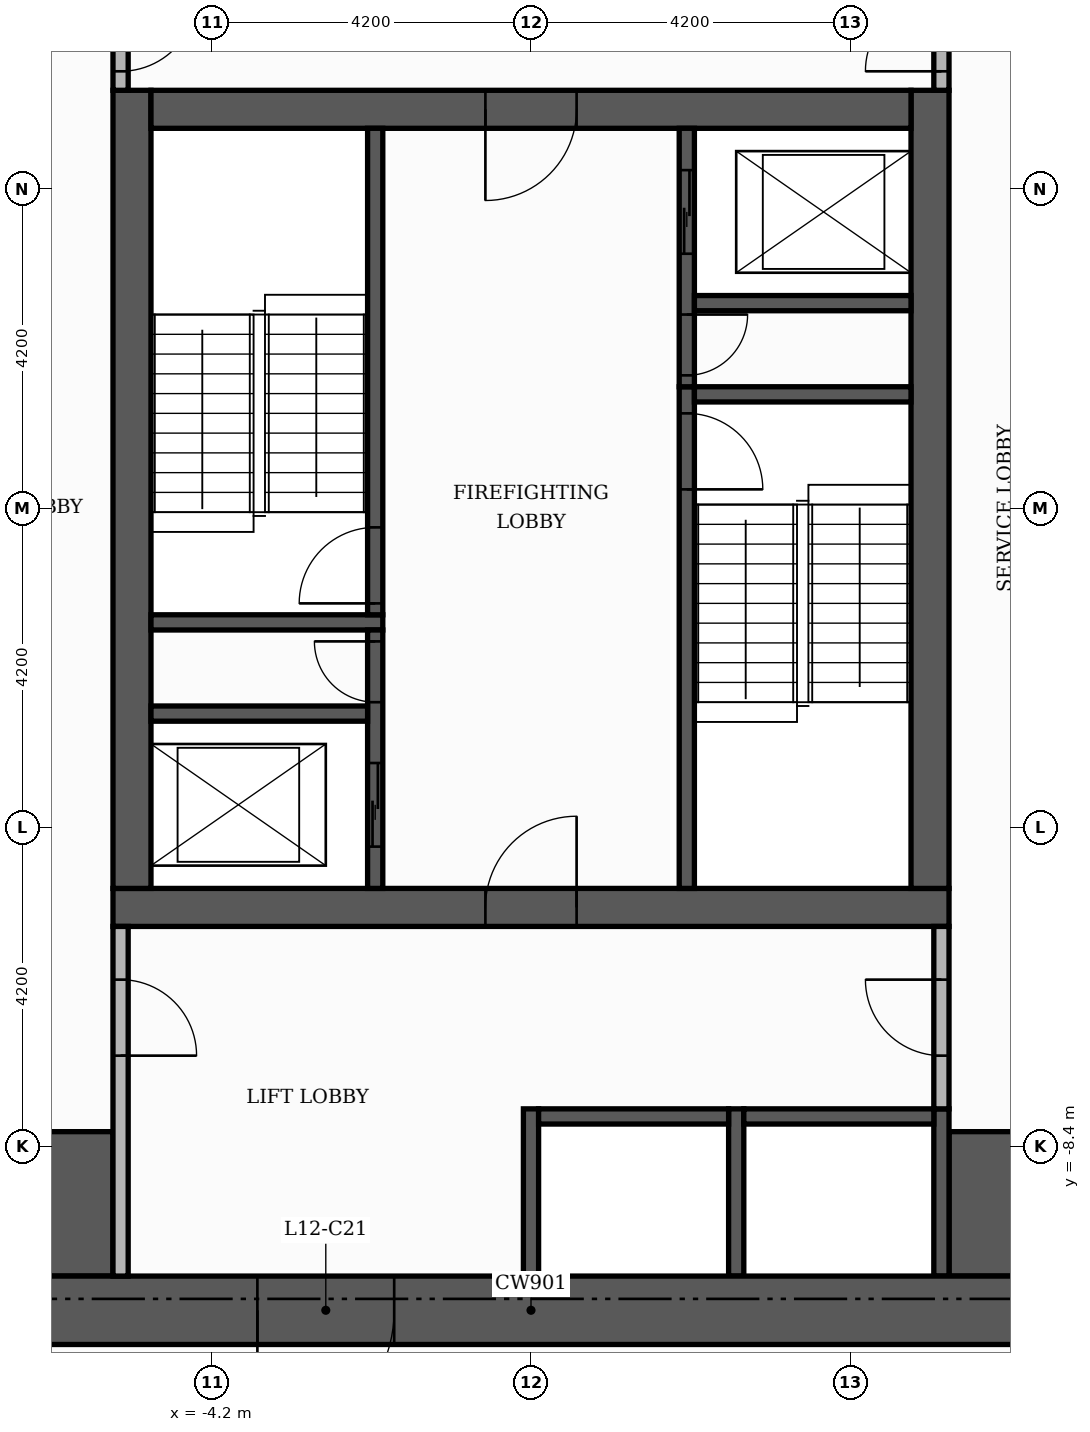
"""IFC4 building model, lengths in metres.
Left out: names, types, materials, properties, quantities, classifications, styles, units other than length and angle.
Written with IfcOpenShell. Run it as: python <this file> out.ifc"""

import sys

from ifc_helpers import new_model, si_unit, direction, frame, frame_2d, origin, place, context, subcontext, project, spatial, rectangle, extrude, element, fill, save


model = new_model("IFC4")
c1 = context("Model", 3, precision=1e-05, world=origin(), true_north=direction((0.0, 1.0)))
c2 = subcontext(c1, "Body", "Model", "MODEL_VIEW")
j1 = project(units=[si_unit("LENGTHUNIT", "METRE"), si_unit("PLANEANGLEUNIT", "RADIAN")], contexts=[c1])
p1 = place(None, origin())
s1 = spatial("IfcSite", under=j1, at=p1, CompositionType="ELEMENT")
p2 = place(p1, origin())
s2 = spatial("IfcBuilding", under=s1, at=p2, CompositionType="ELEMENT")
p3 = place(p2, frame((0.0, 0.0, 54.3)))
s3 = spatial("IfcBuildingStorey", under=s2, at=p3, CompositionType="ELEMENT", Elevation=54.3)
p4 = place(p3, frame((-5.5, -5.25, 0.0), z_axis=(0.0, 0.0, 1.0), x_axis=(1.0, 0.0, 0.0)))
e1 = element("IfcWall", 1, at=p4, inside=s3, PredefinedType="SHEAR", context=c2, shape_type="SweptSolid", body=[
    extrude(rectangle(XDim=11.0, YDim=0.5, at=frame_2d((5.5, 0.0))), origin(), (0.0, 0.0, 1.0), 3.48),
])
p5 = place(p4, frame((4.9, 0.0, 0.0)))
e2 = element("IfcOpeningElement", 2, at=p5, cuts=e1, PredefinedType="OPENING", context=c2, shape_type="SweptSolid", body=[
    extrude(rectangle(XDim=1.2, YDim=2.1, at=frame_2d((0.6, 1.05))), frame((0.0, 0.26, 0.0), z_axis=(0.0, -1.0, 0.0), x_axis=(1.0, 0.0, 0.0)), (0.0, 0.0, 1.0), 0.52),
])
for number, where, z_axis, x_axis in (
    (3, (-5.25, -5.0, 0.0), (0.0, 0.0, 1.0), (0.0, 1.0, 0.0)),
    (4, (5.25, -5.0, 0.0), (0.0, 0.0, 1.0), (0.0, 1.0, 0.0)),
):
    element("IfcWall", number, at=place(p3, frame(where, z_axis=z_axis, x_axis=x_axis)), inside=s3, PredefinedType="SHEAR", context=c2, shape_type="SweptSolid", body=[
        extrude(rectangle(XDim=10.5, YDim=0.5, at=frame_2d((5.25, 0.0))), origin(), (0.0, 0.0, 1.0), 3.48),
    ])
p6 = place(p3, frame((-5.0, 5.25, 0.0), z_axis=(0.0, 0.0, 1.0), x_axis=(1.0, 0.0, 0.0)))
e5 = element("IfcWall", 5, at=p6, inside=s3, PredefinedType="SHEAR", context=c2, shape_type="SweptSolid", body=[
    extrude(rectangle(XDim=10.0, YDim=0.5, at=frame_2d((5.0, 0.0))), origin(), (0.0, 0.0, 1.0), 3.48),
])
p7 = place(p6, frame((4.4, 0.0, 0.0)))
e6 = element("IfcOpeningElement", 6, at=p7, cuts=e5, PredefinedType="OPENING", context=c2, shape_type="SweptSolid", body=[
    extrude(rectangle(XDim=1.2, YDim=2.1, at=frame_2d((0.6, 1.05))), frame((0.0, 0.26, 0.0), z_axis=(0.0, -1.0, 0.0), x_axis=(1.0, 0.0, 0.0)), (0.0, 0.0, 1.0), 0.52),
])
for number, where, z_axis, x_axis in (
    (7, (-10.1, -9.15, 0.0), (0.0, 0.0, 1.0), (1.0, 0.0, 0.0)),
    (8, (5.5, -9.15, 0.0), (0.0, 0.0, 1.0), (1.0, 0.0, 0.0)),
):
    element("IfcWall", number, at=place(p3, frame(where, z_axis=z_axis, x_axis=x_axis)), inside=s3, PredefinedType="SHEAR", context=c2, shape_type="SweptSolid", body=[
        extrude(rectangle(XDim=4.6, YDim=1.9, at=frame_2d((2.3, 0.0))), origin(), (0.0, 0.0, 1.0), 3.48),
    ])
p8 = place(p3, frame((2.05, -5.0, 0.0), z_axis=(0.0, 0.0, 1.0), x_axis=(0.0, 1.0, 0.0)))
e9 = element("IfcWall", 9, at=p8, inside=s3, PredefinedType="SHEAR", context=c2, shape_type="SweptSolid", body=[
    extrude(rectangle(XDim=6.6, YDim=0.2, at=frame_2d((3.3, 0.0))), origin(), (0.0, 0.0, 1.0), 3.48),
])
p9 = place(p8, frame((5.25, 0.0, 0.0)))
e10 = element("IfcOpeningElement", 10, at=p9, cuts=e9, PredefinedType="OPENING", context=c2, shape_type="SweptSolid", body=[
    extrude(rectangle(XDim=1.0, YDim=2.1, at=frame_2d((0.5, 1.05))), frame((0.0, 0.11, 0.0), z_axis=(0.0, -1.0, 0.0), x_axis=(1.0, 0.0, 0.0)), (0.0, 0.0, 1.0), 0.22),
])
p10 = place(p3, frame((-5.0, -1.5, 0.0), z_axis=(0.0, 0.0, 1.0), x_axis=(1.0, 0.0, 0.0)))
e11 = element("IfcWall", 11, at=p10, inside=s3, PredefinedType="SHEAR", context=c2, shape_type="SweptSolid", body=[
    extrude(rectangle(XDim=3.05, YDim=0.2, at=frame_2d((1.525, 0.0))), origin(), (0.0, 0.0, 1.0), 3.48),
])
p11 = place(p3, frame((-2.05, -1.4, 0.0), z_axis=(0.0, 0.0, 1.0), x_axis=(0.0, 1.0, 0.0)))
e12 = element("IfcWall", 12, at=p11, inside=s3, PredefinedType="SHEAR", context=c2, shape_type="SweptSolid", body=[
    extrude(rectangle(XDim=6.4, YDim=0.2, at=frame_2d((3.2, 0.0))), origin(), (0.0, 0.0, 1.0), 3.48),
])
p12 = place(p11, frame((0.15, 0.0, 0.0)))
e13 = element("IfcOpeningElement", 13, at=p12, cuts=e12, PredefinedType="OPENING", context=c2, shape_type="SweptSolid", body=[
    extrude(rectangle(XDim=1.0, YDim=2.1, at=frame_2d((0.5, 1.05))), frame((0.0, 0.11, 0.0), z_axis=(0.0, -1.0, 0.0), x_axis=(1.0, 0.0, 0.0)), (0.0, 0.0, 1.0), 0.22),
])
p13 = place(p3, frame((2.15, 1.5, 0.0), z_axis=(0.0, 0.0, 1.0), x_axis=(1.0, 0.0, 0.0)))
e14 = element("IfcWall", 14, at=p13, inside=s3, PredefinedType="SHEAR", context=c2, shape_type="SweptSolid", body=[
    extrude(rectangle(XDim=2.85, YDim=0.2, at=frame_2d((1.425, 0.0))), origin(), (0.0, 0.0, 1.0), 3.48),
])
for number, where, z_axis, x_axis in (
    (15, (0.0, -10.1, 0.0), (0.0, 0.0, 1.0), (0.0, 1.0, 0.0)),
    (16, (2.7, -10.1, 0.0), (0.0, 0.0, 1.0), (0.0, 1.0, 0.0)),
    (17, (5.4, -10.1, 0.0), (0.0, 0.0, 1.0), (0.0, 1.0, 0.0)),
):
    element("IfcWall", number, at=place(p3, frame(where, z_axis=z_axis, x_axis=x_axis)), inside=s3, PredefinedType="SHEAR", context=c2, shape_type="SweptSolid", body=[
        extrude(rectangle(XDim=2.2, YDim=0.2, at=frame_2d((1.1, 0.0))), origin(), (0.0, 0.0, 1.0), 3.48),
    ])
for number, where, z_axis, x_axis in (
    (18, (0.1, -8.0, 0.0), (0.0, 0.0, 1.0), (1.0, 0.0, 0.0)),
    (19, (2.8, -8.0, 0.0), (0.0, 0.0, 1.0), (1.0, 0.0, 0.0)),
):
    element("IfcWall", number, at=place(p3, frame(where, z_axis=z_axis, x_axis=x_axis)), inside=s3, PredefinedType="SHEAR", context=c2, shape_type="SweptSolid", body=[
        extrude(rectangle(XDim=2.5, YDim=0.2, at=frame_2d((1.25, 0.0))), origin(), (0.0, 0.0, 1.0), 3.48),
    ])
p14 = place(p3, frame((-2.05, -5.0, 0.0), z_axis=(0.0, 0.0, 1.0), x_axis=(0.0, 1.0, 0.0)))
e20 = element("IfcWall", 20, at=p14, inside=s3, PredefinedType="SHEAR", context=c2, shape_type="SweptSolid", body=[
    extrude(rectangle(XDim=3.4, YDim=0.2, at=frame_2d((1.7, 0.0))), origin(), (0.0, 0.0, 1.0), 3.48),
])
p15 = place(p14, frame((0.55, 0.0, 0.0)))
e21 = element("IfcOpeningElement", 21, at=p15, cuts=e20, PredefinedType="OPENING", context=c2, shape_type="SweptSolid", body=[
    extrude(rectangle(XDim=1.1, YDim=2.1, at=frame_2d((0.55, 1.05))), frame((0.0, 0.11, 0.0), z_axis=(0.0, -1.0, 0.0), x_axis=(1.0, 0.0, 0.0)), (0.0, 0.0, 1.0), 0.22),
])
p16 = place(p14, frame((2.45, 0.0, 0.0)))
e22 = element("IfcOpeningElement", 22, at=p16, cuts=e20, PredefinedType="OPENING", context=c2, shape_type="SweptSolid", body=[
    extrude(rectangle(XDim=0.8, YDim=2.1, at=frame_2d((0.4, 1.05))), frame((0.0, 0.11, 0.0), z_axis=(0.0, -1.0, 0.0), x_axis=(1.0, 0.0, 0.0)), (0.0, 0.0, 1.0), 0.22),
])
p17 = place(p3, frame((-5.0, -2.7, 0.0), z_axis=(0.0, 0.0, 1.0), x_axis=(1.0, 0.0, 0.0)))
e23 = element("IfcWall", 23, at=p17, inside=s3, PredefinedType="SHEAR", context=c2, shape_type="SweptSolid", body=[
    extrude(rectangle(XDim=2.85, YDim=0.2, at=frame_2d((1.425, 0.0))), origin(), (0.0, 0.0, 1.0), 3.48),
])
p18 = place(p3, frame((2.05, 1.6, 0.0), z_axis=(0.0, 0.0, 1.0), x_axis=(0.0, 1.0, 0.0)))
e24 = element("IfcWall", 24, at=p18, inside=s3, PredefinedType="SHEAR", context=c2, shape_type="SweptSolid", body=[
    extrude(rectangle(XDim=3.4, YDim=0.2, at=frame_2d((1.7, 0.0))), origin(), (0.0, 0.0, 1.0), 3.48),
])
p19 = place(p18, frame((1.75, 0.0, 0.0)))
e25 = element("IfcOpeningElement", 25, at=p19, cuts=e24, PredefinedType="OPENING", context=c2, shape_type="SweptSolid", body=[
    extrude(rectangle(XDim=1.1, YDim=2.1, at=frame_2d((0.55, 1.05))), frame((0.0, 0.11, 0.0), z_axis=(0.0, -1.0, 0.0), x_axis=(1.0, 0.0, 0.0)), (0.0, 0.0, 1.0), 0.22),
])
p20 = place(p18, frame((0.15, 0.0, 0.0)))
e26 = element("IfcOpeningElement", 26, at=p20, cuts=e24, PredefinedType="OPENING", context=c2, shape_type="SweptSolid", body=[
    extrude(rectangle(XDim=0.8, YDim=2.1, at=frame_2d((0.4, 1.05))), frame((0.0, 0.11, 0.0), z_axis=(0.0, -1.0, 0.0), x_axis=(1.0, 0.0, 0.0)), (0.0, 0.0, 1.0), 0.22),
])
p21 = place(p3, frame((2.15, 2.7, 0.0), z_axis=(0.0, 0.0, 1.0), x_axis=(1.0, 0.0, 0.0)))
e27 = element("IfcWall", 27, at=p21, inside=s3, PredefinedType="SHEAR", context=c2, shape_type="SweptSolid", body=[
    extrude(rectangle(XDim=2.85, YDim=0.2, at=frame_2d((1.425, 0.0))), origin(), (0.0, 0.0, 1.0), 3.48),
])
p22 = place(p3, frame((-11.0, -10.55, 0.0), z_axis=(0.0, 0.0, 1.0), x_axis=(1.0, 0.0, 0.0)))
e28 = element("IfcWall", 28, at=p22, inside=s3, PredefinedType="SHEAR", context=c2, shape_type="SweptSolid", body=[
    extrude(rectangle(XDim=22.0, YDim=0.9, at=frame_2d((11.0, 0.0))), origin(), (0.0, 0.0, 1.0), 3.48),
])
p23 = place(p22, frame((7.4, 0.0, 0.0)))
e29 = element("IfcOpeningElement", 29, at=p23, cuts=e28, PredefinedType="OPENING", context=c2, shape_type="SweptSolid", body=[
    extrude(rectangle(XDim=1.8, YDim=2.2, at=frame_2d((0.9, 1.1))), frame((0.0, 0.46, 0.0), z_axis=(0.0, -1.0, 0.0), x_axis=(1.0, 0.0, 0.0)), (0.0, 0.0, 1.0), 0.92),
])
p24 = place(p3, frame((-5.4, -10.1, 0.0), z_axis=(0.0, 0.0, 1.0), x_axis=(0.0, 1.0, 0.0)))
e30 = element("IfcWall", 30, at=p24, inside=s3, PredefinedType="PARTITIONING", context=c2, shape_type="SweptSolid", body=[
    extrude(rectangle(XDim=4.6, YDim=0.2, at=frame_2d((2.3, 0.0))), origin(), (0.0, 0.0, 1.0), 3.48),
])
p25 = place(p24, frame((2.9, 0.0, 0.0)))
e31 = element("IfcOpeningElement", 31, at=p25, cuts=e30, PredefinedType="OPENING", context=c2, shape_type="SweptSolid", body=[
    extrude(rectangle(XDim=1.0, YDim=2.1, at=frame_2d((0.5, 1.05))), frame((0.0, 0.11, 0.0), z_axis=(0.0, -1.0, 0.0), x_axis=(1.0, 0.0, 0.0)), (0.0, 0.0, 1.0), 0.22),
])
p26 = place(p3, frame((5.4, -7.9, 0.0), z_axis=(0.0, 0.0, 1.0), x_axis=(0.0, 1.0, 0.0)))
e32 = element("IfcWall", 32, at=p26, inside=s3, PredefinedType="PARTITIONING", context=c2, shape_type="SweptSolid", body=[
    extrude(rectangle(XDim=2.4, YDim=0.2, at=frame_2d((1.2, 0.0))), origin(), (0.0, 0.0, 1.0), 3.48),
])
p27 = place(p26, frame((0.7, 0.0, 0.0)))
e33 = element("IfcOpeningElement", 33, at=p27, cuts=e32, PredefinedType="OPENING", context=c2, shape_type="SweptSolid", body=[
    extrude(rectangle(XDim=1.0, YDim=2.1, at=frame_2d((0.5, 1.05))), frame((0.0, 0.11, 0.0), z_axis=(0.0, -1.0, 0.0), x_axis=(1.0, 0.0, 0.0)), (0.0, 0.0, 1.0), 0.22),
])
p28 = place(p3, frame((-5.4, 5.5, 0.0), z_axis=(0.0, 0.0, 1.0), x_axis=(0.0, 1.0, 0.0)))
e34 = element("IfcWall", 34, at=p28, inside=s3, PredefinedType="PARTITIONING", context=c2, shape_type="SweptSolid", body=[
    extrude(rectangle(XDim=1.55, YDim=0.2, at=frame_2d((0.775, 0.0))), origin(), (0.0, 0.0, 1.0), 3.48),
])
p29 = place(p28, frame((0.25, 0.0, 0.0)))
e35 = element("IfcOpeningElement", 35, at=p29, cuts=e34, PredefinedType="OPENING", context=c2, shape_type="SweptSolid", body=[
    extrude(rectangle(XDim=1.0, YDim=2.1, at=frame_2d((0.5, 1.05))), frame((0.0, 0.11, 0.0), z_axis=(0.0, -1.0, 0.0), x_axis=(1.0, 0.0, 0.0)), (0.0, 0.0, 1.0), 0.22),
])
p30 = place(p3, frame((5.4, 5.5, 0.0), z_axis=(0.0, 0.0, 1.0), x_axis=(0.0, 1.0, 0.0)))
e36 = element("IfcWall", 36, at=p30, inside=s3, PredefinedType="PARTITIONING", context=c2, shape_type="SweptSolid", body=[
    extrude(rectangle(XDim=4.6, YDim=0.2, at=frame_2d((2.3, 0.0))), origin(), (0.0, 0.0, 1.0), 3.48),
])
p31 = place(p30, frame((0.25, 0.0, 0.0)))
e37 = element("IfcOpeningElement", 37, at=p31, cuts=e36, PredefinedType="OPENING", context=c2, shape_type="SweptSolid", body=[
    extrude(rectangle(XDim=1.0, YDim=2.1, at=frame_2d((0.5, 1.05))), frame((0.0, 0.11, 0.0), z_axis=(0.0, -1.0, 0.0), x_axis=(1.0, 0.0, 0.0)), (0.0, 0.0, 1.0), 0.22),
])
p32 = place(p19, origin())
e38 = element("IfcDoor", 38, at=p32, inside=s3, OperationType="SLIDING_TO_LEFT", PredefinedType="DOOR", context=c2, shape_type="SweptSolid", body=[
    extrude(rectangle(XDim=1.1, YDim=2.1, at=frame_2d((0.55, 1.05))), frame((0.0, 0.025, 0.0), z_axis=(0.0, -1.0, 0.0), x_axis=(1.0, 0.0, 0.0)), (0.0, 0.0, 1.0), 0.05),
])
fill(e25, e38)
p33 = place(p15, origin())
e39 = element("IfcDoor", 39, at=p33, inside=s3, OperationType="SLIDING_TO_LEFT", PredefinedType="DOOR", context=c2, shape_type="SweptSolid", body=[
    extrude(rectangle(XDim=1.1, YDim=2.1, at=frame_2d((0.55, 1.05))), frame((0.0, 0.025, 0.0), z_axis=(0.0, -1.0, 0.0), x_axis=(1.0, 0.0, 0.0)), (0.0, 0.0, 1.0), 0.05),
])
fill(e21, e39)
p34 = place(p12, origin())
e40 = element("IfcDoor", 40, at=p34, inside=s3, OperationType="SINGLE_SWING_LEFT", PredefinedType="DOOR", context=c2, shape_type="SweptSolid", body=[
    extrude(rectangle(XDim=1.0, YDim=2.1, at=frame_2d((0.5, 1.05))), frame((0.0, 0.025, 0.0), z_axis=(0.0, -1.0, 0.0), x_axis=(1.0, 0.0, 0.0)), (0.0, 0.0, 1.0), 0.05),
])
fill(e13, e40)
p35 = place(p9, frame((1.0, 0.0, 0.0), z_axis=(0.0, 0.0, 1.0), x_axis=(-1.0, 0.0, 0.0)))
e41 = element("IfcDoor", 41, at=p35, inside=s3, OperationType="SINGLE_SWING_LEFT", PredefinedType="DOOR", context=c2, shape_type="SweptSolid", body=[
    extrude(rectangle(XDim=1.0, YDim=2.1, at=frame_2d((0.5, 1.05))), frame((0.0, 0.025, 0.0), z_axis=(0.0, -1.0, 0.0), x_axis=(1.0, 0.0, 0.0)), (0.0, 0.0, 1.0), 0.05),
])
fill(e10, e41)
p36 = place(p20, frame((0.8, 0.0, 0.0), z_axis=(0.0, 0.0, 1.0), x_axis=(-1.0, 0.0, 0.0)))
e42 = element("IfcDoor", 42, at=p36, inside=s3, OperationType="SINGLE_SWING_RIGHT", PredefinedType="DOOR", context=c2, shape_type="SweptSolid", body=[
    extrude(rectangle(XDim=0.8, YDim=2.1, at=frame_2d((0.4, 1.05))), frame((0.0, 0.025, 0.0), z_axis=(0.0, -1.0, 0.0), x_axis=(1.0, 0.0, 0.0)), (0.0, 0.0, 1.0), 0.05),
])
fill(e26, e42)
p37 = place(p16, origin())
e43 = element("IfcDoor", 43, at=p37, inside=s3, OperationType="SINGLE_SWING_RIGHT", PredefinedType="DOOR", context=c2, shape_type="SweptSolid", body=[
    extrude(rectangle(XDim=0.8, YDim=2.1, at=frame_2d((0.4, 1.05))), frame((0.0, 0.025, 0.0), z_axis=(0.0, -1.0, 0.0), x_axis=(1.0, 0.0, 0.0)), (0.0, 0.0, 1.0), 0.05),
])
fill(e22, e43)
p38 = place(p7, frame((1.2, 0.0, 0.0), z_axis=(0.0, 0.0, 1.0), x_axis=(-1.0, 0.0, 0.0)))
e44 = element("IfcDoor", 44, at=p38, inside=s3, OperationType="SINGLE_SWING_LEFT", PredefinedType="DOOR", context=c2, shape_type="SweptSolid", body=[
    extrude(rectangle(XDim=1.2, YDim=2.1, at=frame_2d((0.6, 1.05))), frame((0.0, 0.025, 0.0), z_axis=(0.0, -1.0, 0.0), x_axis=(1.0, 0.0, 0.0)), (0.0, 0.0, 1.0), 0.05),
])
fill(e6, e44)
p39 = place(p5, origin())
e45 = element("IfcDoor", 45, at=p39, inside=s3, OperationType="SINGLE_SWING_RIGHT", PredefinedType="DOOR", context=c2, shape_type="SweptSolid", body=[
    extrude(rectangle(XDim=1.2, YDim=2.1, at=frame_2d((0.6, 1.05))), frame((0.0, 0.025, 0.0), z_axis=(0.0, -1.0, 0.0), x_axis=(1.0, 0.0, 0.0)), (0.0, 0.0, 1.0), 0.05),
])
fill(e2, e45)
p40 = place(p29, frame((1.0, 0.0, 0.0), z_axis=(0.0, 0.0, 1.0), x_axis=(-1.0, 0.0, 0.0)))
e46 = element("IfcDoor", 46, at=p40, inside=s3, OperationType="SINGLE_SWING_RIGHT", PredefinedType="DOOR", context=c2, shape_type="SweptSolid", body=[
    extrude(rectangle(XDim=1.0, YDim=2.1, at=frame_2d((0.5, 1.05))), frame((0.0, 0.025, 0.0), z_axis=(0.0, -1.0, 0.0), x_axis=(1.0, 0.0, 0.0)), (0.0, 0.0, 1.0), 0.05),
])
fill(e35, e46)
p41 = place(p31, origin())
e47 = element("IfcDoor", 47, at=p41, inside=s3, OperationType="SINGLE_SWING_LEFT", PredefinedType="DOOR", context=c2, shape_type="SweptSolid", body=[
    extrude(rectangle(XDim=1.0, YDim=2.1, at=frame_2d((0.5, 1.05))), frame((0.0, 0.025, 0.0), z_axis=(0.0, -1.0, 0.0), x_axis=(1.0, 0.0, 0.0)), (0.0, 0.0, 1.0), 0.05),
])
fill(e37, e47)
p42 = place(p25, frame((1.0, 0.0, 0.0), z_axis=(0.0, 0.0, 1.0), x_axis=(-1.0, 0.0, 0.0)))
e48 = element("IfcDoor", 48, at=p42, inside=s3, OperationType="SINGLE_SWING_LEFT", PredefinedType="DOOR", context=c2, shape_type="SweptSolid", body=[
    extrude(rectangle(XDim=1.0, YDim=2.1, at=frame_2d((0.5, 1.05))), frame((0.0, 0.025, 0.0), z_axis=(0.0, -1.0, 0.0), x_axis=(1.0, 0.0, 0.0)), (0.0, 0.0, 1.0), 0.05),
])
fill(e31, e48)
p43 = place(p27, origin())
e49 = element("IfcDoor", 49, at=p43, inside=s3, OperationType="SINGLE_SWING_RIGHT", PredefinedType="DOOR", context=c2, shape_type="SweptSolid", body=[
    extrude(rectangle(XDim=1.0, YDim=2.1, at=frame_2d((0.5, 1.05))), frame((0.0, 0.025, 0.0), z_axis=(0.0, -1.0, 0.0), x_axis=(1.0, 0.0, 0.0)), (0.0, 0.0, 1.0), 0.05),
])
fill(e33, e49)
p44 = place(p23, frame((1.8, 0.0, 0.0), z_axis=(0.0, 0.0, 1.0), x_axis=(-1.0, 0.0, 0.0)))
e50 = element("IfcDoor", 50, at=p44, inside=s3, OperationType="DOUBLE_DOOR_SINGLE_SWING", PredefinedType="DOOR", context=c2, shape_type="SweptSolid", body=[
    extrude(rectangle(XDim=1.8, YDim=2.2, at=frame_2d((0.9, 1.1))), frame((0.0, 0.025, 0.0), z_axis=(0.0, -1.0, 0.0), x_axis=(1.0, 0.0, 0.0)), (0.0, 0.0, 1.0), 0.05),
])
fill(e29, e50)
save(model, sys.argv[1])
